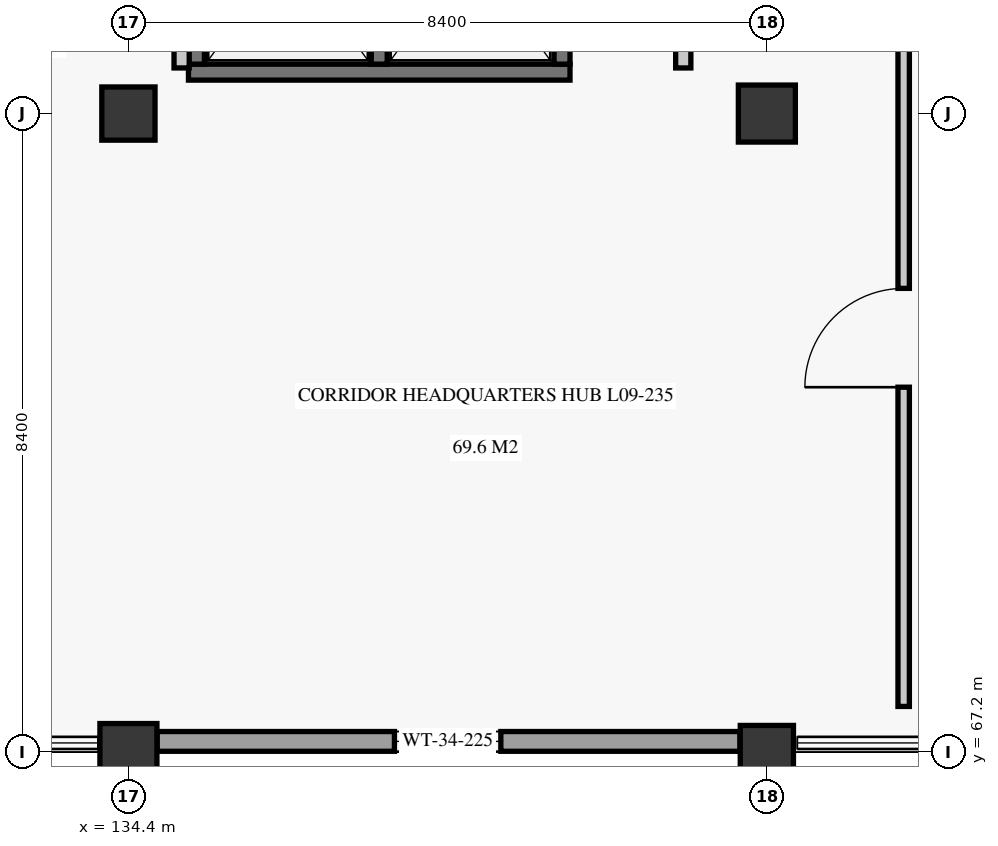
"""IFC4 building model, lengths in metres.
Left out: names, types, materials, properties, quantities, classifications, styles, units other than length and angle.
Written with IfcOpenShell. Run it as: python <this file> out.ifc"""

import sys

from ifc_helpers import new_model, si_unit, direction, frame, frame_2d, origin, origin_2d, place, context, subcontext, project, spatial, rectangle, extrude, element, fill, save


model = new_model("IFC4")
c1 = context("Model", 3, precision=1e-05, world=origin(), true_north=direction((0.0, 1.0)))
c2 = subcontext(c1, "Body", "Model", "MODEL_VIEW")
j1 = project(units=[si_unit("LENGTHUNIT", "METRE"), si_unit("PLANEANGLEUNIT", "RADIAN")], contexts=[c1])
p1 = place(None, origin())
s1 = spatial("IfcSite", under=j1, at=p1, CompositionType="ELEMENT")
p2 = place(p1, origin())
s2 = spatial("IfcBuilding", under=s1, at=p2, CompositionType="ELEMENT")
p3 = place(p2, frame((0.0, 0.0, 38.7)))
s3 = spatial("IfcBuildingStorey", under=s2, at=p3, CompositionType="ELEMENT", Elevation=38.7)
p4 = place(p3, frame((134.4, 67.2, 0.0), z_axis=(0.0, 0.0, 1.0), x_axis=(1.0, 0.0, 0.0)))
e1 = element("IfcColumn", 1, at=p4, inside=s3, PredefinedType="COLUMN", context=c2, shape_type="SweptSolid", body=[
    extrude(rectangle(XDim=0.75, YDim=0.75, at=origin_2d()), origin(), (0.0, 0.0, 1.0), 3.72),
])
for number, where, z_axis, x_axis in (
    (2, (134.4, 75.6, 0.0), (0.0, 0.0, 1.0), (1.0, 0.0, 0.0)),
    (3, (142.8, 67.2, 0.0), (0.0, 0.0, 1.0), (1.0, 0.0, 0.0)),
):
    element("IfcColumn", number, at=place(p3, frame(where, z_axis=z_axis, x_axis=x_axis)), inside=s3, PredefinedType="COLUMN", context=c2, shape_type="SweptSolid", body=[
        extrude(rectangle(XDim=0.7, YDim=0.7, at=origin_2d()), origin(), (0.0, 0.0, 1.0), 3.72),
    ])
p5 = place(p3, frame((142.8, 75.6, 0.0), z_axis=(0.0, 0.0, 1.0), x_axis=(1.0, 0.0, 0.0)))
e4 = element("IfcColumn", 4, at=p5, inside=s3, PredefinedType="COLUMN", context=c2, shape_type="SweptSolid", body=[
    extrude(rectangle(XDim=0.75, YDim=0.75, at=origin_2d()), origin(), (0.0, 0.0, 1.0), 3.72),
])
p6 = place(p3, frame((134.778, 67.34, 0.0), z_axis=(0.0, 0.0, 1.0), x_axis=(1.0, 0.0, 0.0)))
e5 = element("IfcWall", 5, at=p6, inside=s3, PredefinedType="SOLIDWALL", context=c2, shape_type="SweptSolid", body=[
    extrude(rectangle(XDim=7.668, YDim=0.26, at=frame_2d((3.834, 0.0))), origin(), (0.0, 0.0, 1.0), 3.04),
])
p7 = place(p6, frame((3.122, 0.0, 0.85)))
e6 = element("IfcOpeningElement", 6, at=p7, cuts=e5, PredefinedType="OPENING", context=c2, shape_type="SweptSolid", body=[
    extrude(rectangle(XDim=1.4, YDim=1.7, at=frame_2d((0.7, 0.85))), frame((0.0, 0.14, 0.0), z_axis=(0.0, -1.0, 0.0), x_axis=(1.0, 0.0, 0.0)), (0.0, 0.0, 1.0), 0.28),
])
p8 = place(p3, frame((135.19, 76.145, 0.0), z_axis=(0.0, 0.0, 1.0), x_axis=(1.0, 0.0, 0.0)))
e7 = element("IfcWall", 7, at=p8, inside=s3, PredefinedType="SHEAR", context=c2, shape_type="SweptSolid", body=[
    extrude(rectangle(XDim=5.02, YDim=0.21, at=frame_2d((2.51, 0.0))), origin(), (0.0, 0.0, 1.0), 3.72),
])
for number, where, z_axis, x_axis in (
    (8, (135.295, 76.25, 0.0), (0.0, 0.0, 1.0), (0.0, 1.0, 0.0)),
    (9, (140.105, 76.25, 0.0), (0.0, 0.0, 1.0), (0.0, 1.0, 0.0)),
    (10, (137.7, 76.25, 0.0), (0.0, 0.0, 1.0), (0.0, 1.0, 0.0)),
):
    element("IfcWall", number, at=place(p3, frame(where, z_axis=z_axis, x_axis=x_axis)), inside=s3, PredefinedType="SHEAR", context=c2, shape_type="SweptSolid", body=[
        extrude(rectangle(XDim=3.0, YDim=0.21, at=frame_2d((1.5, 0.0))), origin(), (0.0, 0.0, 1.0), 3.72),
    ])
for number, where, z_axis, x_axis in (
    (11, (135.1, 76.2, 0.0), (0.0, 0.0, 1.0), (0.0, 1.0, 0.0)),
    (12, (141.7, 76.2, 0.0), (0.0, 0.0, 1.0), (0.0, 1.0, 0.0)),
):
    element("IfcWall", number, at=place(p3, frame(where, z_axis=z_axis, x_axis=x_axis)), inside=s3, PredefinedType="PARTITIONING", context=c2, shape_type="SweptSolid", body=[
        extrude(rectangle(XDim=7.25, YDim=0.2, at=frame_2d((3.625, 0.0))), origin(), (0.0, 0.0, 1.0), 3.34),
    ])
p9 = place(p3, frame((144.6, 67.8, 0.0), z_axis=(0.0, 0.0, 1.0), x_axis=(0.0, 1.0, 0.0)))
e13 = element("IfcWall", 13, at=p9, inside=s3, PredefinedType="PARTITIONING", context=c2, shape_type="SweptSolid", body=[
    extrude(rectangle(XDim=32.4, YDim=0.15, at=frame_2d((16.2, 0.0))), origin(), (0.0, 0.0, 1.0), 3.34),
])
p10 = place(p9, frame((4.2, 0.0, 0.0)))
e14 = element("IfcOpeningElement", 14, at=p10, cuts=e13, PredefinedType="OPENING", context=c2, shape_type="SweptSolid", body=[
    extrude(rectangle(XDim=1.3, YDim=2.35, at=frame_2d((0.65, 1.175))), frame((0.0, 0.085, 0.0), z_axis=(0.0, -1.0, 0.0), x_axis=(1.0, 0.0, 0.0)), (0.0, 0.0, 1.0), 0.17),
])
p11 = place(p9, frame((18.0, 0.0, 0.0)))
e15 = element("IfcOpeningElement", 15, at=p11, cuts=e13, PredefinedType="OPENING", context=c2, shape_type="SweptSolid", body=[
    extrude(rectangle(XDim=1.3, YDim=2.35, at=frame_2d((0.65, 1.175))), frame((0.0, 0.085, 0.0), z_axis=(0.0, -1.0, 0.0), x_axis=(1.0, 0.0, 0.0)), (0.0, 0.0, 1.0), 0.17),
])
p12 = place(p7, origin())
e16 = element("IfcWindow", 16, at=p12, inside=s3, PartitioningType="SINGLE_PANEL", PredefinedType="WINDOW", context=c2, shape_type="SweptSolid", body=[
    extrude(rectangle(XDim=1.4, YDim=1.7, at=frame_2d((0.7, 0.85))), frame((0.0, 0.03, 0.0), z_axis=(0.0, -1.0, 0.0), x_axis=(1.0, 0.0, 0.0)), (0.0, 0.0, 1.0), 0.06),
])
fill(e6, e16)
p13 = place(p10, origin())
e17 = element("IfcDoor", 17, at=p13, inside=s3, OperationType="SINGLE_SWING_LEFT", PredefinedType="DOOR", context=c2, shape_type="SweptSolid", body=[
    extrude(rectangle(XDim=1.3, YDim=2.35, at=frame_2d((0.65, 1.175))), frame((0.0, 0.025, 0.0), z_axis=(0.0, -1.0, 0.0), x_axis=(1.0, 0.0, 0.0)), (0.0, 0.0, 1.0), 0.05),
])
fill(e14, e17)
save(model, sys.argv[1])
